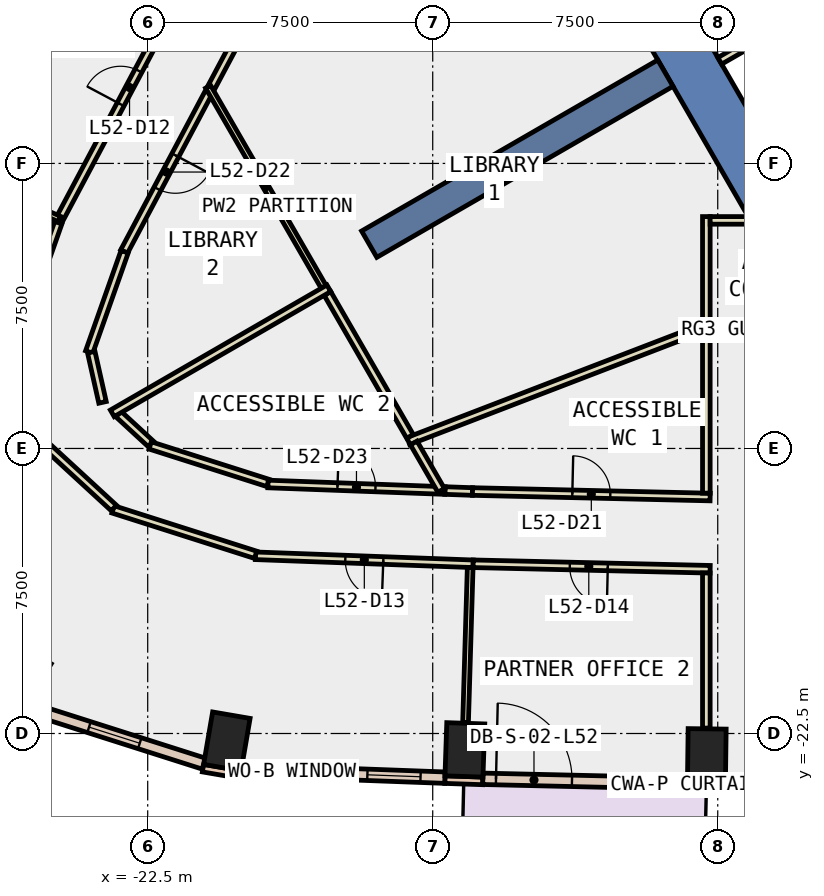
"""IFC4 building model, lengths in metres.
Left out: names, types, materials, properties, quantities, classifications, styles, units other than length and angle.
Written with IfcOpenShell. Run it as: python <this file> out.ifc"""

import sys

from ifc_helpers import new_model, si_unit, direction, frame, frame_2d, origin, origin_2d, place, context, subcontext, project, spatial, polyline, rectangle, outline, extrude, element, fill, save


model = new_model("IFC4")
c1 = context("Model", 3, precision=1e-05, world=origin(), true_north=direction((0.0, 1.0)))
c2 = subcontext(c1, "Body", "Model", "MODEL_VIEW")
j1 = project(units=[si_unit("LENGTHUNIT", "METRE"), si_unit("PLANEANGLEUNIT", "RADIAN")], contexts=[c1])
p1 = place(None, origin())
s1 = spatial("IfcSite", under=j1, at=p1, CompositionType="ELEMENT")
p2 = place(p1, origin())
s2 = spatial("IfcBuilding", under=s1, at=p2, CompositionType="ELEMENT")
p3 = place(p2, frame((0.0, 0.0, 231.8)))
s3 = spatial("IfcBuildingStorey", under=s2, at=p3, CompositionType="ELEMENT", Elevation=231.8)
for number, where, z_axis, x_axis in (
    (1, (-20.417, -22.708, -0.4), (0.0, 0.0, 1.0), (-0.986, 0.169, 0.0)),
    (2, (-14.154, -22.931, -0.4), (0.0, 0.0, 1.0), (-0.999, 0.034, 0.0)),
    (3, (-7.788, -23.078, -0.4), (0.0, 0.0, 1.0), (-1.0, 0.013, 0.0)),
):
    element("IfcColumn", number, at=place(p3, frame(where, z_axis=z_axis, x_axis=x_axis)), inside=s3, PredefinedType="COLUMN", context=c2, shape_type="SweptSolid", body=[
        extrude(rectangle(XDim=1.0, YDim=1.4, at=origin_2d()), origin(), (0.0, 0.0, 1.0), 4.0),
    ])
p4 = place(p3, frame((0.0, 0.0, -0.4)))
e4 = element("IfcWall", 4, at=p4, inside=s3, PredefinedType="SHEAR", context=c2, shape_type="SweptSolid", body=[
    extrude(outline(polyline([(-13.279, 2.5), (-6.64, -9.0), (-5.831, -7.6), (-11.662, 2.5), (-13.279, 2.5)])), origin(), (0.0, 0.0, 1.0), 4.0),
])
p5 = place(p3, frame((-8.877, -5.125, -0.4), z_axis=(0.0, 0.0, 1.0), x_axis=(-0.866017533419, -0.500013631625, 0.0)))
e5 = element("IfcWall", 5, at=p5, inside=s3, PredefinedType="SHEAR", context=c2, shape_type="SweptSolid", body=[
    extrude(rectangle(XDim=9.0, YDim=0.8, at=frame_2d((4.5, 0.0))), origin(), (0.0, 0.0, 1.0), 4.0),
])
p6 = place(p3, frame((-21.045, -23.412, 0.0), z_axis=(0.0, 0.0, 1.0), x_axis=(0.985631544579, -0.168909615862, 0.0)))
e6 = element("IfcWall", 6, at=p6, inside=s3, PredefinedType="STANDARD", context=c2, shape_type="SweptSolid", body=[
    extrude(rectangle(XDim=1.0, YDim=0.2, at=frame_2d((0.5, 0.0))), origin(), (0.0, 0.0, 1.0), 3.6),
])
p7 = place(p3, frame((-14.681, -23.713, 0.0), z_axis=(0.0, 0.0, 1.0), x_axis=(0.999415245245, -0.034193092457, 0.0)))
e7 = element("IfcWall", 7, at=p7, inside=s3, PredefinedType="STANDARD", context=c2, shape_type="SweptSolid", body=[
    extrude(rectangle(XDim=1.0, YDim=0.2, at=frame_2d((0.5, 0.0))), origin(), (0.0, 0.0, 1.0), 3.6),
])
p8 = place(p3, frame((-8.299, -23.871, 0.0), z_axis=(0.0, 0.0, 1.0), x_axis=(0.999903186316, -0.013914668364, 0.0)))
e8 = element("IfcWall", 8, at=p8, inside=s3, PredefinedType="STANDARD", context=c2, shape_type="SweptSolid", body=[
    extrude(rectangle(XDim=1.0, YDim=0.2, at=frame_2d((0.5, 0.0))), origin(), (0.0, 0.0, 1.0), 3.6),
])
p9 = place(p3, frame((-20.04, -23.464, 0.0), z_axis=(0.0, 0.0, 1.0), x_axis=(0.999318693414, -0.036907302717, 0.0)))
e9 = element("IfcWall", 9, at=p9, inside=s3, PredefinedType="STANDARD", context=c2, shape_type="SweptSolid", body=[
    extrude(rectangle(XDim=5.365, YDim=0.3, at=frame_2d((2.682, 0.0))), origin(), (0.0, 0.0, 1.0), 3.6),
])
p10 = place(p9, frame((0.641, 0.0, 0.9)))
e10 = element("IfcOpeningElement", 10, at=p10, cuts=e9, PredefinedType="OPENING", context=c2, shape_type="SweptSolid", body=[
    extrude(rectangle(XDim=1.4, YDim=2.6, at=frame_2d((0.7, 1.3))), frame((0.0, 0.16, 0.0), z_axis=(0.0, -1.0, 0.0), x_axis=(1.0, 0.0, 0.0)), (0.0, 0.0, 1.0), 0.32),
])
p11 = place(p9, frame((3.323, 0.0, 0.9)))
e11 = element("IfcOpeningElement", 11, at=p11, cuts=e9, PredefinedType="OPENING", context=c2, shape_type="SweptSolid", body=[
    extrude(rectangle(XDim=1.4, YDim=2.6, at=frame_2d((0.7, 1.3))), frame((0.0, 0.16, 0.0), z_axis=(0.0, -1.0, 0.0), x_axis=(1.0, 0.0, 0.0)), (0.0, 0.0, 1.0), 0.32),
])
p12 = place(p3, frame((-13.681, -23.692, 0.0), z_axis=(0.0, 0.0, 1.0), x_axis=(0.999734766333, -0.023030349233, 0.0)))
e12 = element("IfcWall", 12, at=p12, inside=s3, PredefinedType="STANDARD", context=c2, shape_type="SweptSolid", body=[
    extrude(rectangle(XDim=5.385, YDim=0.3, at=frame_2d((2.693, 0.0))), origin(), (0.0, 0.0, 1.0), 3.6),
])
p13 = place(p12, frame((0.346, 0.0, 0.0)))
e13 = element("IfcOpeningElement", 13, at=p13, cuts=e12, PredefinedType="OPENING", context=c2, shape_type="SweptSolid", body=[
    extrude(rectangle(XDim=2.0, YDim=2.4, at=frame_2d((1.0, 1.2))), frame((0.0, 0.16, 0.0), z_axis=(0.0, -1.0, 0.0), x_axis=(1.0, 0.0, 0.0)), (0.0, 0.0, 1.0), 0.32),
])
p14 = place(p12, frame((3.339, 0.0, 0.9)))
e14 = element("IfcOpeningElement", 14, at=p14, cuts=e12, PredefinedType="OPENING", context=c2, shape_type="SweptSolid", body=[
    extrude(rectangle(XDim=1.4, YDim=2.6, at=frame_2d((0.7, 1.3))), frame((0.0, 0.16, 0.0), z_axis=(0.0, -1.0, 0.0), x_axis=(1.0, 0.0, 0.0)), (0.0, 0.0, 1.0), 0.32),
])
p15 = place(p3, frame((-25.729, -21.795, 0.0), z_axis=(0.0, 0.0, 1.0), x_axis=(0.952886818649, -0.30332608006, 0.0)))
e15 = element("IfcWall", 15, at=p15, inside=s3, PredefinedType="STANDARD", context=c2, shape_type="SweptSolid", body=[
    extrude(rectangle(XDim=4.939, YDim=0.3, at=frame_2d((2.469, 0.0))), origin(), (0.0, 0.0, 1.0), 3.6),
])
p16 = place(p15, frame((1.769, 0.0, 0.9)))
e16 = element("IfcOpeningElement", 16, at=p16, cuts=e15, PredefinedType="OPENING", context=c2, shape_type="SweptSolid", body=[
    extrude(rectangle(XDim=1.4, YDim=2.6, at=frame_2d((0.7, 1.3))), frame((0.0, 0.16, 0.0), z_axis=(0.0, -1.0, 0.0), x_axis=(1.0, 0.0, 0.0)), (0.0, 0.0, 1.0), 0.32),
])
p17 = place(p3, frame((-19.419, -2.856, 0.0), z_axis=(0.0, 0.0, 1.0), x_axis=(-0.469627838973, -0.882864481595, 0.0)))
e17 = element("IfcWall", 17, at=p17, inside=s3, PredefinedType="PARTITIONING", context=c2, shape_type="SweptSolid", body=[
    extrude(rectangle(XDim=2.996, YDim=0.2, at=frame_2d((1.498, 0.0))), origin(), (0.0, 0.0, 1.0), 3.6),
])
p18 = place(p3, frame((-14.679, -16.107, 0.0), z_axis=(0.0, 0.0, 1.0), x_axis=(0.999351224613, -0.036015689132, 0.0)))
e18 = element("IfcWall", 18, at=p18, inside=s3, PredefinedType="PARTITIONING", context=c2, shape_type="SweptSolid", body=[
    extrude(rectangle(XDim=0.725, YDim=0.2, at=frame_2d((0.363, 0.0))), origin(), (0.0, 0.0, 1.0), 3.6),
])
p19 = place(p3, frame((-13.954, -16.133, 0.0), z_axis=(0.0, 0.0, 1.0), x_axis=(0.999731273021, -0.023181495732, 0.0)))
e19 = element("IfcWall", 19, at=p19, inside=s3, PredefinedType="PARTITIONING", context=c2, shape_type="SweptSolid", body=[
    extrude(rectangle(XDim=6.256, YDim=0.2, at=frame_2d((3.128, 0.0))), origin(), (0.0, 0.0, 1.0), 3.6),
])
p20 = place(p19, frame((2.628, 0.0, 0.0)))
e20 = element("IfcOpeningElement", 20, at=p20, cuts=e19, PredefinedType="OPENING", context=c2, shape_type="SweptSolid", body=[
    extrude(rectangle(XDim=1.0, YDim=2.1, at=frame_2d((0.5, 1.05))), frame((0.0, 0.11, 0.0), z_axis=(0.0, -1.0, 0.0), x_axis=(1.0, 0.0, 0.0)), (0.0, 0.0, 1.0), 0.22),
])
p21 = place(p3, frame((-20.896, -5.634, 0.0), z_axis=(0.0, 0.0, 1.0), x_axis=(-0.469448951755, -0.882959614986, 0.0)))
e21 = element("IfcWall", 21, at=p21, inside=s3, PredefinedType="PARTITIONING", context=c2, shape_type="SweptSolid", body=[
    extrude(rectangle(XDim=4.74, YDim=0.2, at=frame_2d((2.37, 0.0))), origin(), (0.0, 0.0, 1.0), 3.6),
])
p22 = place(p21, frame((1.87, 0.0, 0.0)))
e22 = element("IfcOpeningElement", 22, at=p22, cuts=e21, PredefinedType="OPENING", context=c2, shape_type="SweptSolid", body=[
    extrude(rectangle(XDim=1.0, YDim=2.1, at=frame_2d((0.5, 1.05))), frame((0.0, 0.11, 0.0), z_axis=(0.0, -1.0, 0.0), x_axis=(1.0, 0.0, 0.0)), (0.0, 0.0, 1.0), 0.22),
])
p23 = place(p3, frame((-23.108, -9.825, 0.0), z_axis=(0.0, 0.0, 1.0), x_axis=(-0.333166995935, -0.942867834227, 0.0)))
e23 = element("IfcWall", 23, at=p23, inside=s3, PredefinedType="PARTITIONING", context=c2, shape_type="SweptSolid", body=[
    extrude(rectangle(XDim=2.798, YDim=0.2, at=frame_2d((1.399, 0.0))), origin(), (0.0, 0.0, 1.0), 3.6),
])
p24 = place(p3, frame((-23.985, -12.467, 0.0), z_axis=(0.0, 0.0, 1.0), x_axis=(0.2188980935, -0.975747725932, 0.0)))
e24 = element("IfcWall", 24, at=p24, inside=s3, PredefinedType="PARTITIONING", context=c2, shape_type="SweptSolid", body=[
    extrude(rectangle(XDim=1.353, YDim=0.2, at=frame_2d((0.676, 0.0))), origin(), (0.0, 0.0, 1.0), 3.6),
])
p25 = place(p3, frame((-23.272, -14.093, 0.0), z_axis=(0.0, 0.0, 1.0), x_axis=(0.735605495063, -0.677410182705, 0.0)))
e25 = element("IfcWall", 25, at=p25, inside=s3, PredefinedType="PARTITIONING", context=c2, shape_type="SweptSolid", body=[
    extrude(rectangle(XDim=1.166, YDim=0.2, at=frame_2d((0.583, 0.0))), origin(), (0.0, 0.0, 1.0), 3.6),
])
p26 = place(p3, frame((-22.435, -14.92, 0.0), z_axis=(0.0, 0.0, 1.0), x_axis=(0.952831275662, -0.303500510906, 0.0)))
e26 = element("IfcWall", 26, at=p26, inside=s3, PredefinedType="PARTITIONING", context=c2, shape_type="SweptSolid", body=[
    extrude(rectangle(XDim=3.259, YDim=0.2, at=frame_2d((1.629, 0.0))), origin(), (0.0, 0.0, 1.0), 3.6),
])
p27 = place(p3, frame((-19.335, -15.935, 0.0), z_axis=(0.0, 0.0, 1.0), x_axis=(0.999319348495, -0.036889561184, 0.0)))
e27 = element("IfcWall", 27, at=p27, inside=s3, PredefinedType="PARTITIONING", context=c2, shape_type="SweptSolid", body=[
    extrude(rectangle(XDim=4.659, YDim=0.2, at=frame_2d((2.33, 0.0))), origin(), (0.0, 0.0, 1.0), 3.6),
])
p28 = place(p27, frame((1.83, 0.0, 0.0)))
e28 = element("IfcOpeningElement", 28, at=p28, cuts=e27, PredefinedType="OPENING", context=c2, shape_type="SweptSolid", body=[
    extrude(rectangle(XDim=1.0, YDim=2.1, at=frame_2d((0.5, 1.05))), frame((0.0, 0.11, 0.0), z_axis=(0.0, -1.0, 0.0), x_axis=(1.0, 0.0, 0.0)), (0.0, 0.0, 1.0), 0.22),
])
p29 = place(p3, frame((-24.866, -9.053, 0.0), z_axis=(0.0, 0.0, 1.0), x_axis=(0.469431794586, 0.882968736837, 0.0)))
e29 = element("IfcWall", 29, at=p29, inside=s3, PredefinedType="PARTITIONING", context=c2, shape_type="SweptSolid", body=[
    extrude(rectangle(XDim=8.046, YDim=0.2, at=frame_2d((4.023, 0.0))), origin(), (0.0, 0.0, 1.0), 3.6),
])
p30 = place(p29, frame((3.522, 0.0, 0.0)))
e30 = element("IfcOpeningElement", 30, at=p30, cuts=e29, PredefinedType="OPENING", context=c2, shape_type="SweptSolid", body=[
    extrude(rectangle(XDim=1.0, YDim=2.1, at=frame_2d((0.5, 1.05))), frame((0.0, 0.11, 0.0), z_axis=(0.0, -1.0, 0.0), x_axis=(1.0, 0.0, 0.0)), (0.0, 0.0, 1.0), 0.22),
])
p31 = place(p3, frame((-13.936, -18.035, 0.0), z_axis=(0.0, 0.0, 1.0), x_axis=(-0.999322629955, 0.036800560578, 0.0)))
e31 = element("IfcWall", 31, at=p31, inside=s3, PredefinedType="PARTITIONING", context=c2, shape_type="SweptSolid", body=[
    extrude(rectangle(XDim=5.732, YDim=0.2, at=frame_2d((2.866, 0.0))), origin(), (0.0, 0.0, 1.0), 3.6),
])
p32 = place(p31, frame((2.366, 0.0, 0.0)))
e32 = element("IfcOpeningElement", 32, at=p32, cuts=e31, PredefinedType="OPENING", context=c2, shape_type="SweptSolid", body=[
    extrude(rectangle(XDim=1.0, YDim=2.1, at=frame_2d((0.5, 1.05))), frame((0.0, 0.11, 0.0), z_axis=(0.0, -1.0, 0.0), x_axis=(1.0, 0.0, 0.0)), (0.0, 0.0, 1.0), 0.22),
])
p33 = place(p3, frame((-19.66, -17.798, 0.0), z_axis=(0.0, 0.0, 1.0), x_axis=(-0.952838618572, 0.303477457083, 0.0)))
e33 = element("IfcWall", 33, at=p33, inside=s3, PredefinedType="PARTITIONING", context=c2, shape_type="SweptSolid", body=[
    extrude(rectangle(XDim=3.938, YDim=0.2, at=frame_2d((1.969, 0.0))), origin(), (0.0, 0.0, 1.0), 3.6),
])
p34 = place(p3, frame((-23.391, -16.566, 0.0), z_axis=(0.0, 0.0, 1.0), x_axis=(-0.735846476242, 0.677148405745, 0.0)))
e34 = element("IfcWall", 34, at=p34, inside=s3, PredefinedType="PARTITIONING", context=c2, shape_type="SweptSolid", body=[
    extrude(rectangle(XDim=2.878, YDim=0.2, at=frame_2d((1.439, 0.0))), origin(), (0.0, 0.0, 1.0), 3.6),
])
p35 = place(p3, frame((-26.013, -12.345, 0.0), z_axis=(0.0, 0.0, 1.0), x_axis=(0.333116923704, 0.942885526001, 0.0)))
e35 = element("IfcWall", 35, at=p35, inside=s3, PredefinedType="PARTITIONING", context=c2, shape_type="SweptSolid", body=[
    extrude(rectangle(XDim=3.485, YDim=0.2, at=frame_2d((1.742, 0.0))), origin(), (0.0, 0.0, 1.0), 3.6),
])
p36 = place(p3, frame((-7.7, -18.179, 0.0), z_axis=(0.0, 0.0, 1.0), x_axis=(-0.999729714353, 0.023248618029, 0.0)))
e36 = element("IfcWall", 36, at=p36, inside=s3, PredefinedType="PARTITIONING", context=c2, shape_type="SweptSolid", body=[
    extrude(rectangle(XDim=6.238, YDim=0.2, at=frame_2d((3.119, 0.0))), origin(), (0.0, 0.0, 1.0), 3.6),
])
p37 = place(p36, frame((2.694, 0.0, 0.0)))
e37 = element("IfcOpeningElement", 37, at=p37, cuts=e36, PredefinedType="OPENING", context=c2, shape_type="SweptSolid", body=[
    extrude(rectangle(XDim=1.0, YDim=2.1, at=frame_2d((0.5, 1.05))), frame((0.0, 0.11, 0.0), z_axis=(0.0, -1.0, 0.0), x_axis=(1.0, 0.0, 0.0)), (0.0, 0.0, 1.0), 0.22),
])
p38 = place(p3, frame((-5.888, -3.902, 0.0), z_axis=(0.0, 0.0, 1.0), x_axis=(-0.866316547501, -0.499495384889, 0.0)))
e38 = element("IfcWall", 38, at=p38, inside=s3, PredefinedType="PARTITIONING", context=c2, shape_type="SweptSolid", body=[
    extrude(rectangle(XDim=1.8, YDim=0.2, at=frame_2d((0.9, 0.0))), origin(), (0.0, 0.0, 1.0), 3.6),
])
p39 = place(p3, frame((-7.8, -11.69, 0.0), z_axis=(0.0, 0.0, 1.0), x_axis=(0.0, 1.0, 0.0)))
e39 = element("IfcWall", 39, at=p39, inside=s3, PredefinedType="PARTITIONING", context=c2, shape_type="SweptSolid", body=[
    extrude(rectangle(XDim=2.791, YDim=0.2, at=frame_2d((1.396, 0.0))), origin(), (0.0, 0.0, 1.0), 3.6),
])
p40 = place(p3, frame((-7.7, -8.999, 0.0), z_axis=(0.0, 0.0, 1.0), x_axis=(1.0, 0.0, 0.0)))
e40 = element("IfcWall", 40, at=p40, inside=s3, PredefinedType="PARTITIONING", context=c2, shape_type="SweptSolid", body=[
    extrude(rectangle(XDim=1.059, YDim=0.2, at=frame_2d((0.529, 0.0))), origin(), (0.0, 0.0, 1.0), 3.6),
])
p41 = place(p3, frame((-7.8, -16.176, 0.0), z_axis=(0.0, 0.0, 1.0), x_axis=(0.0, 1.0, 0.0)))
e41 = element("IfcWall", 41, at=p41, inside=s3, PredefinedType="PARTITIONING", context=c2, shape_type="SweptSolid", body=[
    extrude(rectangle(XDim=4.286, YDim=0.2, at=frame_2d((2.143, 0.0))), origin(), (0.0, 0.0, 1.0), 3.6),
])
p42 = place(p3, frame((-7.8, -22.358, 0.0), z_axis=(0.0, 0.0, 1.0), x_axis=(0.0, 1.0, 0.0)))
e42 = element("IfcWall", 42, at=p42, inside=s3, PredefinedType="PARTITIONING", context=c2, shape_type="SweptSolid", body=[
    extrude(rectangle(XDim=4.082, YDim=0.2, at=frame_2d((2.041, 0.0))), origin(), (0.0, 0.0, 1.0), 3.6),
])
p43 = place(p3, frame((-7.707, -11.755, 0.0), z_axis=(0.0, 0.0, 1.0), x_axis=(-0.933420343818, -0.358784701105, 0.0)))
e43 = element("IfcWall", 43, at=p43, inside=s3, PredefinedType="PARTITIONING", context=c2, shape_type="SweptSolid", body=[
    extrude(rectangle(XDim=8.501, YDim=0.2, at=frame_2d((4.25, 0.0))), origin(), (0.0, 0.0, 1.0), 3.6),
])
p44 = place(p3, frame((-17.87, -10.749, 0.0), z_axis=(0.0, 0.0, 1.0), x_axis=(-0.499907758807, 0.866078652713, 0.0)))
e44 = element("IfcWall", 44, at=p44, inside=s3, PredefinedType="PARTITIONING", context=c2, shape_type="SweptSolid", body=[
    extrude(rectangle(XDim=6.083, YDim=0.15, at=frame_2d((3.042, 0.0))), origin(), (0.0, 0.0, 1.0), 3.6),
])
p45 = place(p3, frame((-15.599, -14.682, 0.0), z_axis=(0.0, 0.0, 1.0), x_axis=(-0.500033987016, 0.866005780482, 0.0)))
e45 = element("IfcWall", 45, at=p45, inside=s3, PredefinedType="PARTITIONING", context=c2, shape_type="SweptSolid", body=[
    extrude(rectangle(XDim=4.342, YDim=0.2, at=frame_2d((2.171, 0.0))), origin(), (0.0, 0.0, 1.0), 3.6),
])
p46 = place(p3, frame((-14.778, -16.103, 0.0), z_axis=(0.0, 0.0, 1.0), x_axis=(-0.500495009846, 0.865739421027, 0.0)))
e46 = element("IfcWall", 46, at=p46, inside=s3, PredefinedType="PARTITIONING", context=c2, shape_type="SweptSolid", body=[
    extrude(rectangle(XDim=1.44, YDim=0.2, at=frame_2d((0.72, 0.0))), origin(), (0.0, 0.0, 1.0), 3.6),
])
p47 = place(p3, frame((-17.733, -10.785, 0.0), z_axis=(0.0, 0.0, 1.0), x_axis=(-0.865978611197, -0.500081038382, 0.0)))
e47 = element("IfcWall", 47, at=p47, inside=s3, PredefinedType="PARTITIONING", context=c2, shape_type="SweptSolid", body=[
    extrude(rectangle(XDim=6.581, YDim=0.2, at=frame_2d((3.291, 0.0))), origin(), (0.0, 0.0, 1.0), 3.6),
])
p48 = place(p3, frame((-24.819, -8.964, 0.0), z_axis=(0.0, 0.0, 1.0), x_axis=(-0.915460951187, 0.402406817602, 0.0)))
e48 = element("IfcWall", 48, at=p48, inside=s3, PredefinedType="PARTITIONING", context=c2, shape_type="SweptSolid", body=[
    extrude(rectangle(XDim=4.192, YDim=0.15, at=frame_2d((2.096, 0.0))), origin(), (0.0, 0.0, 1.0), 3.6),
])
p49 = place(p3, frame((-14.014, -18.132, 0.0), z_axis=(0.0, 0.0, 1.0), x_axis=(-0.029914181802, -0.999552470722, 0.0)))
e49 = element("IfcWall", 49, at=p49, inside=s3, PredefinedType="PARTITIONING", context=c2, shape_type="SweptSolid", body=[
    extrude(rectangle(XDim=4.081, YDim=0.15, at=frame_2d((2.04, 0.0))), origin(), (0.0, 0.0, 1.0), 3.6),
])
p50 = place(p10, origin())
e50 = element("IfcWindow", 50, at=p50, inside=s3, PartitioningType="SINGLE_PANEL", PredefinedType="WINDOW", context=c2, shape_type="SweptSolid", body=[
    extrude(rectangle(XDim=1.4, YDim=2.6, at=frame_2d((0.7, 1.3))), frame((0.0, 0.03, 0.0), z_axis=(0.0, -1.0, 0.0), x_axis=(1.0, 0.0, 0.0)), (0.0, 0.0, 1.0), 0.06),
])
fill(e10, e50)
p51 = place(p11, origin())
e51 = element("IfcWindow", 51, at=p51, inside=s3, PartitioningType="SINGLE_PANEL", PredefinedType="WINDOW", context=c2, shape_type="SweptSolid", body=[
    extrude(rectangle(XDim=1.4, YDim=2.6, at=frame_2d((0.7, 1.3))), frame((0.0, 0.03, 0.0), z_axis=(0.0, -1.0, 0.0), x_axis=(1.0, 0.0, 0.0)), (0.0, 0.0, 1.0), 0.06),
])
fill(e11, e51)
p52 = place(p13, origin())
e52 = element("IfcDoor", 52, at=p52, inside=s3, OperationType="SLIDING_TO_LEFT", PredefinedType="DOOR", context=c2, shape_type="SweptSolid", body=[
    extrude(rectangle(XDim=2.0, YDim=2.4, at=frame_2d((1.0, 1.2))), frame((0.0, 0.025, 0.0), z_axis=(0.0, -1.0, 0.0), x_axis=(1.0, 0.0, 0.0)), (0.0, 0.0, 1.0), 0.05),
])
fill(e13, e52)
p53 = place(p14, origin())
e53 = element("IfcWindow", 53, at=p53, inside=s3, PartitioningType="SINGLE_PANEL", PredefinedType="WINDOW", context=c2, shape_type="SweptSolid", body=[
    extrude(rectangle(XDim=1.4, YDim=2.6, at=frame_2d((0.7, 1.3))), frame((0.0, 0.03, 0.0), z_axis=(0.0, -1.0, 0.0), x_axis=(1.0, 0.0, 0.0)), (0.0, 0.0, 1.0), 0.06),
])
fill(e14, e53)
p54 = place(p16, origin())
e54 = element("IfcWindow", 54, at=p54, inside=s3, PartitioningType="SINGLE_PANEL", PredefinedType="WINDOW", context=c2, shape_type="SweptSolid", body=[
    extrude(rectangle(XDim=1.4, YDim=2.6, at=frame_2d((0.7, 1.3))), frame((0.0, 0.03, 0.0), z_axis=(0.0, -1.0, 0.0), x_axis=(1.0, 0.0, 0.0)), (0.0, 0.0, 1.0), 0.06),
])
fill(e16, e54)
p55 = place(p30, origin())
e55 = element("IfcDoor", 55, at=p55, inside=s3, OperationType="SINGLE_SWING_LEFT", PredefinedType="DOOR", context=c2, shape_type="SweptSolid", body=[
    extrude(rectangle(XDim=1.0, YDim=2.1, at=frame_2d((0.5, 1.05))), frame((0.0, 0.025, 0.0), z_axis=(0.0, -1.0, 0.0), x_axis=(1.0, 0.0, 0.0)), (0.0, 0.0, 1.0), 0.05),
])
fill(e30, e55)
p56 = place(p32, origin())
e56 = element("IfcDoor", 56, at=p56, inside=s3, OperationType="SINGLE_SWING_LEFT", PredefinedType="DOOR", context=c2, shape_type="SweptSolid", body=[
    extrude(rectangle(XDim=1.0, YDim=2.1, at=frame_2d((0.5, 1.05))), frame((0.0, 0.025, 0.0), z_axis=(0.0, -1.0, 0.0), x_axis=(1.0, 0.0, 0.0)), (0.0, 0.0, 1.0), 0.05),
])
fill(e32, e56)
p57 = place(p37, origin())
e57 = element("IfcDoor", 57, at=p57, inside=s3, OperationType="SINGLE_SWING_LEFT", PredefinedType="DOOR", context=c2, shape_type="SweptSolid", body=[
    extrude(rectangle(XDim=1.0, YDim=2.1, at=frame_2d((0.5, 1.05))), frame((0.0, 0.025, 0.0), z_axis=(0.0, -1.0, 0.0), x_axis=(1.0, 0.0, 0.0)), (0.0, 0.0, 1.0), 0.05),
])
fill(e37, e57)
p58 = place(p20, origin())
e58 = element("IfcDoor", 58, at=p58, inside=s3, OperationType="SINGLE_SWING_LEFT", PredefinedType="DOOR", context=c2, shape_type="SweptSolid", body=[
    extrude(rectangle(XDim=1.0, YDim=2.1, at=frame_2d((0.5, 1.05))), frame((0.0, 0.025, 0.0), z_axis=(0.0, -1.0, 0.0), x_axis=(1.0, 0.0, 0.0)), (0.0, 0.0, 1.0), 0.05),
])
fill(e20, e58)
p59 = place(p22, origin())
e59 = element("IfcDoor", 59, at=p59, inside=s3, OperationType="SINGLE_SWING_LEFT", PredefinedType="DOOR", context=c2, shape_type="SweptSolid", body=[
    extrude(rectangle(XDim=1.0, YDim=2.1, at=frame_2d((0.5, 1.05))), frame((0.0, 0.025, 0.0), z_axis=(0.0, -1.0, 0.0), x_axis=(1.0, 0.0, 0.0)), (0.0, 0.0, 1.0), 0.05),
])
fill(e22, e59)
p60 = place(p28, origin())
e60 = element("IfcDoor", 60, at=p60, inside=s3, OperationType="SINGLE_SWING_LEFT", PredefinedType="DOOR", context=c2, shape_type="SweptSolid", body=[
    extrude(rectangle(XDim=1.0, YDim=2.1, at=frame_2d((0.5, 1.05))), frame((0.0, 0.025, 0.0), z_axis=(0.0, -1.0, 0.0), x_axis=(1.0, 0.0, 0.0)), (0.0, 0.0, 1.0), 0.05),
])
fill(e28, e60)
save(model, sys.argv[1])
